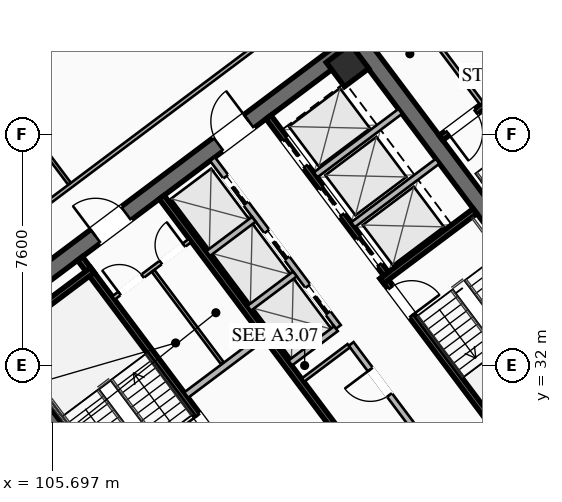
"""IFC4 building model, lengths in metres.
Left out: names, types, materials, properties, quantities, classifications, styles, units other than length and angle.
Written with IfcOpenShell. Run it as: python <this file> out.ifc"""

import sys

from ifc_helpers import new_model, si_unit, direction, frame, frame_2d, origin, origin_2d, place, context, subcontext, project, spatial, rectangle, hollow_rectangle, extrude, element, fill, save


model = new_model("IFC4")
c1 = context("Model", 3, precision=1e-05, world=origin(), true_north=direction((0.0, 1.0)))
c2 = subcontext(c1, "Body", "Model", "MODEL_VIEW")
j1 = project(units=[si_unit("LENGTHUNIT", "METRE"), si_unit("PLANEANGLEUNIT", "RADIAN")], contexts=[c1])
p1 = place(None, origin())
s1 = spatial("IfcSite", under=j1, at=p1, CompositionType="ELEMENT")
p2 = place(p1, origin())
s2 = spatial("IfcBuilding", under=s1, at=p2, CompositionType="ELEMENT")
p3 = place(p2, frame((0.0, 0.0, 196.05)))
s3 = spatial("IfcBuildingStorey", under=s2, at=p3, CompositionType="ELEMENT", Elevation=196.05)
for number, where, z_axis, x_axis in (
    (1, (112.436, 21.077, 0.0), (0.0, 0.0, 1.0), (-0.6, 0.8, 0.0)),
    (2, (115.564, 42.923, 0.0), (0.0, 0.0, 1.0), (0.6, -0.8, 0.0)),
):
    element("IfcWall", number, at=place(p3, frame(where, z_axis=z_axis, x_axis=x_axis)), inside=s3, PredefinedType="SHEAR", context=c2, shape_type="SweptSolid", body=[
        extrude(rectangle(XDim=15.6, YDim=0.55, at=frame_2d((7.8, 0.0))), origin(), (0.0, 0.0, 1.0), 3.55),
    ])
p4 = place(p3, frame((124.539, 30.498, 0.0), z_axis=(0.0, 0.0, 1.0), x_axis=(-0.799998054672, -0.600002593761, 0.0)))
e3 = element("IfcWall", 3, at=p4, inside=s3, PredefinedType="SHEAR", context=c2, shape_type="SweptSolid", body=[
    extrude(rectangle(XDim=15.06, YDim=0.55, at=frame_2d((7.53, 0.0))), origin(), (0.0, 0.0, 1.0), 3.55),
])
p5 = place(p4, frame((9.23, 0.0, 0.0)))
e4 = element("IfcOpeningElement", 4, at=p5, cuts=e3, PredefinedType="OPENING", context=c2, shape_type="SweptSolid", body=[
    extrude(rectangle(XDim=1.25, YDim=2.25, at=frame_2d((0.625, 1.125))), frame((0.0, 0.285, 0.0), z_axis=(0.0, -1.0, 0.0), x_axis=(1.0, 0.0, 0.0)), (0.0, 0.0, 1.0), 0.57),
])
p6 = place(p4, frame((4.18, 0.0, 0.0)))
e5 = element("IfcOpeningElement", 5, at=p6, cuts=e3, PredefinedType="OPENING", context=c2, shape_type="SweptSolid", body=[
    extrude(rectangle(XDim=1.25, YDim=2.25, at=frame_2d((0.625, 1.125))), frame((0.0, 0.285, 0.0), z_axis=(0.0, -1.0, 0.0), x_axis=(1.0, 0.0, 0.0)), (0.0, 0.0, 1.0), 0.57),
])
p7 = place(p3, frame((103.461, 33.502, 0.0), z_axis=(0.0, 0.0, 1.0), x_axis=(0.799998054672, 0.600002593761, 0.0)))
e6 = element("IfcWall", 6, at=p7, inside=s3, PredefinedType="SHEAR", context=c2, shape_type="SweptSolid", body=[
    extrude(rectangle(XDim=15.06, YDim=0.55, at=frame_2d((7.53, 0.0))), origin(), (0.0, 0.0, 1.0), 3.55),
])
p8 = place(p7, frame((4.58, 0.0, 0.0)))
e7 = element("IfcOpeningElement", 7, at=p8, cuts=e6, PredefinedType="OPENING", context=c2, shape_type="SweptSolid", body=[
    extrude(rectangle(XDim=1.25, YDim=2.25, at=frame_2d((0.625, 1.125))), frame((0.0, 0.285, 0.0), z_axis=(0.0, -1.0, 0.0), x_axis=(1.0, 0.0, 0.0)), (0.0, 0.0, 1.0), 0.57),
])
p9 = place(p7, frame((9.63, 0.0, 0.0)))
e8 = element("IfcOpeningElement", 8, at=p9, cuts=e6, PredefinedType="OPENING", context=c2, shape_type="SweptSolid", body=[
    extrude(rectangle(XDim=1.25, YDim=2.25, at=frame_2d((0.625, 1.125))), frame((0.0, 0.285, 0.0), z_axis=(0.0, -1.0, 0.0), x_axis=(1.0, 0.0, 0.0)), (0.0, 0.0, 1.0), 0.57),
])
p10 = place(p3, frame((115.41, 41.87, 0.0), z_axis=(0.0, 0.0, 1.0), x_axis=(0.799999996291, 0.600000004945, 0.0)))
e9 = element("IfcColumn", 9, at=p10, inside=s3, PredefinedType="COLUMN", context=c2, shape_type="SweptSolid", body=[
    extrude(hollow_rectangle(XDim=1.0, YDim=1.0, WallThickness=0.04, at=origin_2d()), origin(), (0.0, 0.0, 1.0), 3.25),
])
p11 = place(p3, frame((98.652, 41.464, 0.0), z_axis=(0.0, 0.0, 1.0), x_axis=(0.799997780501, 0.60000295932, 0.0)))
e10 = element("IfcWall", 10, at=p11, inside=s3, PredefinedType="SOLIDWALL", context=c2, shape_type="SweptSolid", body=[
    extrude(rectangle(XDim=13.2, YDim=0.28, at=frame_2d((6.6, 0.0))), origin(), (0.0, 0.0, 1.0), 3.25),
])
p12 = place(p11, frame((2.2, 0.0, 0.0)))
e11 = element("IfcOpeningElement", 11, at=p12, cuts=e10, PredefinedType="OPENING", context=c2, shape_type="SweptSolid", body=[
    extrude(rectangle(XDim=1.3, YDim=2.15, at=frame_2d((0.65, 1.075))), frame((0.0, 0.15, 0.0), z_axis=(0.0, -1.0, 0.0), x_axis=(1.0, 0.0, 0.0)), (0.0, 0.0, 1.0), 0.3),
])
p13 = place(p11, frame((9.182, 0.0, 0.85)))
e12 = element("IfcOpeningElement", 12, at=p13, cuts=e10, PredefinedType="OPENING", context=c2, shape_type="SweptSolid", body=[
    extrude(rectangle(XDim=1.8, YDim=1.92, at=frame_2d((0.9, 0.96))), frame((0.0, 0.15, 0.0), z_axis=(0.0, -1.0, 0.0), x_axis=(1.0, 0.0, 0.0)), (0.0, 0.0, 1.0), 0.3),
])
p14 = place(p3, frame((111.44, 29.08, 0.0), z_axis=(0.0, 0.0, 1.0), x_axis=(-0.59999029481, 0.8000072788, 0.0)))
e13 = element("IfcWall", 13, at=p14, inside=s3, PredefinedType="SHEAR", context=c2, shape_type="SweptSolid", body=[
    extrude(rectangle(XDim=8.05, YDim=0.2, at=frame_2d((4.025, 0.0))), origin(), (0.0, 0.0, 1.0), 3.25),
])
p15 = place(p14, frame((0.45, 0.0, 0.0)))
e14 = element("IfcOpeningElement", 14, at=p15, cuts=e13, PredefinedType="OPENING", context=c2, shape_type="SweptSolid", body=[
    extrude(rectangle(XDim=1.15, YDim=2.2, at=frame_2d((0.575, 1.1))), frame((0.0, 0.11, 0.0), z_axis=(0.0, -1.0, 0.0), x_axis=(1.0, 0.0, 0.0)), (0.0, 0.0, 1.0), 0.22),
])
p16 = place(p3, frame((103.956, 32.842, 0.0), z_axis=(0.0, 0.0, 1.0), x_axis=(0.800015298837, 0.599979601008, 0.0)))
e15 = element("IfcWall", 15, at=p16, inside=s3, PredefinedType="SHEAR", context=c2, shape_type="SweptSolid", body=[
    extrude(rectangle(XDim=3.83, YDim=0.2, at=frame_2d((1.915, 0.0))), origin(), (0.0, 0.0, 1.0), 3.25),
])
p17 = place(p3, frame((116.56, 34.92, 0.0), z_axis=(0.0, 0.0, 1.0), x_axis=(0.59999029481, -0.8000072788, 0.0)))
e16 = element("IfcWall", 16, at=p17, inside=s3, PredefinedType="SHEAR", context=c2, shape_type="SweptSolid", body=[
    extrude(rectangle(XDim=8.05, YDim=0.2, at=frame_2d((4.025, 0.0))), origin(), (0.0, 0.0, 1.0), 3.25),
])
p18 = place(p17, frame((0.45, 0.0, 0.0)))
e17 = element("IfcOpeningElement", 17, at=p18, cuts=e16, PredefinedType="OPENING", context=c2, shape_type="SweptSolid", body=[
    extrude(rectangle(XDim=1.15, YDim=2.2, at=frame_2d((0.575, 1.1))), frame((0.0, 0.11, 0.0), z_axis=(0.0, -1.0, 0.0), x_axis=(1.0, 0.0, 0.0)), (0.0, 0.0, 1.0), 0.22),
])
p19 = place(p3, frame((116.54, 34.78, 0.0), z_axis=(0.0, 0.0, 1.0), x_axis=(0.800015298837, 0.599979601008, 0.0)))
e18 = element("IfcWall", 18, at=p19, inside=s3, PredefinedType="SHEAR", context=c2, shape_type="SweptSolid", body=[
    extrude(rectangle(XDim=3.83, YDim=0.2, at=frame_2d((1.915, 0.0))), origin(), (0.0, 0.0, 1.0), 3.25),
])
p20 = place(p3, frame((117.998, 25.936, 0.0), z_axis=(0.0, 0.0, 1.0), x_axis=(-0.600002693989, 0.799997979501, 0.0)))
e19 = element("IfcWall", 19, at=p20, inside=s3, PredefinedType="SHEAR", context=c2, shape_type="SweptSolid", body=[
    extrude(rectangle(XDim=14.5, YDim=0.2, at=frame_2d((7.25, 0.0))), origin(), (0.0, 0.0, 1.0), 3.25),
])
p21 = place(p3, frame((110.104, 31.028, 0.0), z_axis=(0.0, 0.0, 1.0), x_axis=(0.800018601094, 0.59997519774, 0.0)))
e20 = element("IfcWall", 20, at=p21, inside=s3, PredefinedType="SOLIDWALL", context=c2, shape_type="SweptSolid", body=[
    extrude(rectangle(XDim=3.15, YDim=0.22, at=frame_2d((1.575, 0.0))), origin(), (0.0, 0.0, 1.0), 2.393),
])
p22 = place(p3, frame((112.81, 40.17, 0.0), z_axis=(0.0, 0.0, 1.0), x_axis=(0.599993943644, -0.800004542231, 0.0)))
e21 = element("IfcWall", 21, at=p22, inside=s3, PredefinedType="SHEAR", context=c2, shape_type="SweptSolid", body=[
    extrude(rectangle(XDim=6.45, YDim=0.2, at=frame_2d((3.225, 0.0))), origin(), (0.0, 0.0, 1.0), 3.25),
])
p23 = place(p22, frame((4.975, 0.0, 0.0)))
e22 = element("IfcOpeningElement", 22, at=p23, cuts=e21, PredefinedType="OPENING", context=c2, shape_type="SweptSolid", body=[
    extrude(rectangle(XDim=1.1, YDim=2.2, at=frame_2d((0.55, 1.1))), frame((0.0, 0.11, 0.0), z_axis=(0.0, -1.0, 0.0), x_axis=(1.0, 0.0, 0.0)), (0.0, 0.0, 1.0), 0.22),
])
p24 = place(p22, frame((2.925, 0.0, 0.0)))
e23 = element("IfcOpeningElement", 23, at=p24, cuts=e21, PredefinedType="OPENING", context=c2, shape_type="SweptSolid", body=[
    extrude(rectangle(XDim=1.1, YDim=2.2, at=frame_2d((0.55, 1.1))), frame((0.0, 0.11, 0.0), z_axis=(0.0, -1.0, 0.0), x_axis=(1.0, 0.0, 0.0)), (0.0, 0.0, 1.0), 0.22),
])
p25 = place(p22, frame((0.925, 0.0, 0.0)))
e24 = element("IfcOpeningElement", 24, at=p25, cuts=e21, PredefinedType="OPENING", context=c2, shape_type="SweptSolid", body=[
    extrude(rectangle(XDim=1.1, YDim=2.2, at=frame_2d((0.55, 1.1))), frame((0.0, 0.11, 0.0), z_axis=(0.0, -1.0, 0.0), x_axis=(1.0, 0.0, 0.0)), (0.0, 0.0, 1.0), 0.22),
])
for number, where, z_axis, x_axis in (
    (25, (115.59, 36.63, 0.0), (0.0, 0.0, 1.0), (0.8, 0.6, 0.0)),
    (26, (114.36, 38.27, 0.0), (0.0, 0.0, 1.0), (0.8, 0.6, 0.0)),
):
    element("IfcWall", number, at=place(p3, frame(where, z_axis=z_axis, x_axis=x_axis)), inside=s3, PredefinedType="SOLIDWALL", context=c2, shape_type="SweptSolid", body=[
        extrude(rectangle(XDim=3.48, YDim=0.2, at=frame_2d((1.74, 0.0))), origin(), (0.0, 0.0, 1.0), 3.25),
    ])
p26 = place(p3, frame((107.71, 34.22, 0.0), z_axis=(0.0, 0.0, 1.0), x_axis=(0.799981399002, 0.60002480053, 0.0)))
e27 = element("IfcWall", 27, at=p26, inside=s3, PredefinedType="PARTITIONING", context=c2, shape_type="SweptSolid", body=[
    extrude(rectangle(XDim=3.15, YDim=0.135, at=frame_2d((1.575, 0.0))), origin(), (0.0, 0.0, 1.0), 2.393),
])
p27 = place(p26, frame((0.25, 0.0, 0.0)))
e28 = element("IfcOpeningElement", 28, at=p27, cuts=e27, PredefinedType="OPENING", context=c2, shape_type="SweptSolid", body=[
    extrude(rectangle(XDim=0.95, YDim=2.05, at=frame_2d((0.475, 1.025))), frame((0.0, 0.077, 0.0), z_axis=(0.0, -1.0, 0.0), x_axis=(1.0, 0.0, 0.0)), (0.0, 0.0, 1.0), 0.155),
])
p28 = place(p26, frame((1.95, 0.0, 0.0)))
e29 = element("IfcOpeningElement", 29, at=p28, cuts=e27, PredefinedType="OPENING", context=c2, shape_type="SweptSolid", body=[
    extrude(rectangle(XDim=0.95, YDim=2.05, at=frame_2d((0.475, 1.025))), frame((0.0, 0.077, 0.0), z_axis=(0.0, -1.0, 0.0), x_axis=(1.0, 0.0, 0.0)), (0.0, 0.0, 1.0), 0.155),
])
p29 = place(p3, frame((111.296, 32.072, 0.0), z_axis=(0.0, 0.0, 1.0), x_axis=(-0.59995887973, 0.800030838552, 0.0)))
e30 = element("IfcWall", 30, at=p29, inside=s3, PredefinedType="PARTITIONING", context=c2, shape_type="SweptSolid", body=[
    extrude(rectangle(XDim=3.8, YDim=0.11, at=frame_2d((1.9, 0.0))), origin(), (0.0, 0.0, 1.0), 2.393),
])
p30 = place(p3, frame((119.67, 27.19, 0.0), z_axis=(0.0, 0.0, 1.0), x_axis=(-0.599988677396, 0.800008491828, 0.0)))
e31 = element("IfcWall", 31, at=p30, inside=s3, PredefinedType="SOLIDWALL", context=c2, shape_type="SweptSolid", body=[
    extrude(rectangle(XDim=6.9, YDim=0.2, at=frame_2d((3.45, 0.0))), origin(), (0.0, 0.0, 1.0), 2.393),
])
p31 = place(p30, frame((0.85, 0.0, 0.0)))
e32 = element("IfcOpeningElement", 32, at=p31, cuts=e31, PredefinedType="OPENING", context=c2, shape_type="SweptSolid", body=[
    extrude(rectangle(XDim=0.95, YDim=2.05, at=frame_2d((0.475, 1.025))), frame((0.0, 0.11, 0.0), z_axis=(0.0, -1.0, 0.0), x_axis=(1.0, 0.0, 0.0)), (0.0, 0.0, 1.0), 0.22),
])
p32 = place(p30, frame((4.8, 0.0, 0.0)))
e33 = element("IfcOpeningElement", 33, at=p32, cuts=e31, PredefinedType="OPENING", context=c2, shape_type="SweptSolid", body=[
    extrude(rectangle(XDim=1.05, YDim=2.2, at=frame_2d((0.525, 1.1))), frame((0.0, 0.11, 0.0), z_axis=(0.0, -1.0, 0.0), x_axis=(1.0, 0.0, 0.0)), (0.0, 0.0, 1.0), 0.22),
])
p33 = place(p3, frame((113.946, 31.522, 0.0), z_axis=(0.0, 0.0, 1.0), x_axis=(0.8, 0.6, 0.0)))
e34 = element("IfcWall", 34, at=p33, inside=s3, PredefinedType="PARTITIONING", context=c2, shape_type="SweptSolid", body=[
    extrude(rectangle(XDim=1.88, YDim=0.135, at=frame_2d((0.94, 0.0))), origin(), (0.0, 0.0, 1.0), 2.393),
])
p34 = place(p3, frame((115.11, 33.27, 0.0), z_axis=(0.0, 0.0, 1.0), x_axis=(-0.600011322243, 0.799991508192, 0.0)))
e35 = element("IfcWall", 35, at=p34, inside=s3, PredefinedType="SOLIDWALL", context=c2, shape_type="SweptSolid", body=[
    extrude(rectangle(XDim=6.9, YDim=0.2, at=frame_2d((3.45, 0.0))), origin(), (0.0, 0.0, 1.0), 3.25),
])
p35 = place(p34, frame((0.575, 0.0, 0.0)))
e36 = element("IfcOpeningElement", 36, at=p35, cuts=e35, PredefinedType="OPENING", context=c2, shape_type="SweptSolid", body=[
    extrude(rectangle(XDim=1.1, YDim=2.2, at=frame_2d((0.55, 1.1))), frame((0.0, 0.11, 0.0), z_axis=(0.0, -1.0, 0.0), x_axis=(1.0, 0.0, 0.0)), (0.0, 0.0, 1.0), 0.22),
])
p36 = place(p34, frame((2.825, 0.0, 0.0)))
e37 = element("IfcOpeningElement", 37, at=p36, cuts=e35, PredefinedType="OPENING", context=c2, shape_type="SweptSolid", body=[
    extrude(rectangle(XDim=1.1, YDim=2.2, at=frame_2d((0.55, 1.1))), frame((0.0, 0.11, 0.0), z_axis=(0.0, -1.0, 0.0), x_axis=(1.0, 0.0, 0.0)), (0.0, 0.0, 1.0), 0.22),
])
p37 = place(p34, frame((5.075, 0.0, 0.0)))
e38 = element("IfcOpeningElement", 38, at=p37, cuts=e35, PredefinedType="OPENING", context=c2, shape_type="SweptSolid", body=[
    extrude(rectangle(XDim=1.1, YDim=2.2, at=frame_2d((0.55, 1.1))), frame((0.0, 0.11, 0.0), z_axis=(0.0, -1.0, 0.0), x_axis=(1.0, 0.0, 0.0)), (0.0, 0.0, 1.0), 0.22),
])
p38 = place(p3, frame((113.526, 32.082, 0.0), z_axis=(0.0, 0.0, 1.0), x_axis=(0.800046745961, 0.599937666993, 0.0)))
e39 = element("IfcWall", 39, at=p38, inside=s3, PredefinedType="SOLIDWALL", context=c2, shape_type="SweptSolid", body=[
    extrude(rectangle(XDim=1.88, YDim=0.2, at=frame_2d((0.94, 0.0))), origin(), (0.0, 0.0, 1.0), 3.25),
])
p39 = place(p3, frame((112.176, 33.882, 0.0), z_axis=(0.0, 0.0, 1.0), x_axis=(0.8, 0.6, 0.0)))
e40 = element("IfcWall", 40, at=p39, inside=s3, PredefinedType="SOLIDWALL", context=c2, shape_type="SweptSolid", body=[
    extrude(rectangle(XDim=1.88, YDim=0.2, at=frame_2d((0.94, 0.0))), origin(), (0.0, 0.0, 1.0), 3.25),
])
p40 = place(p3, frame((110.826, 35.682, 0.0), z_axis=(0.0, 0.0, 1.0), x_axis=(0.799984418148, 0.600020775241, 0.0)))
e41 = element("IfcWall", 41, at=p40, inside=s3, PredefinedType="SOLIDWALL", context=c2, shape_type="SweptSolid", body=[
    extrude(rectangle(XDim=1.88, YDim=0.2, at=frame_2d((0.94, 0.0))), origin(), (0.0, 0.0, 1.0), 3.25),
])
p41 = place(p3, frame((121.204, 41.528, 0.0), z_axis=(0.0, 0.0, 1.0), x_axis=(-0.800017232136, -0.599977023131, 0.0)))
e42 = element("IfcWall", 42, at=p41, inside=s3, PredefinedType="SHEAR", context=c2, shape_type="SweptSolid", body=[
    extrude(rectangle(XDim=3.4, YDim=0.2, at=frame_2d((1.7, 0.0))), origin(), (0.0, 0.0, 1.0), 3.25),
])
p42 = place(p41, frame((1.975, 0.0, 0.0)))
e43 = element("IfcOpeningElement", 43, at=p42, cuts=e42, PredefinedType="OPENING", context=c2, shape_type="SweptSolid", body=[
    extrude(rectangle(XDim=1.15, YDim=2.2, at=frame_2d((0.575, 1.1))), frame((0.0, 0.11, 0.0), z_axis=(0.0, -1.0, 0.0), x_axis=(1.0, 0.0, 0.0)), (0.0, 0.0, 1.0), 0.22),
])
p43 = place(p3, frame((119.824, 40.618, 0.0), z_axis=(0.0, 0.0, 1.0), x_axis=(-0.599982243973, 0.800013316712, 0.0)))
e44 = element("IfcWall", 44, at=p43, inside=s3, PredefinedType="PARTITIONING", context=c2, shape_type="SweptSolid", body=[
    extrude(rectangle(XDim=4.4, YDim=0.135, at=frame_2d((2.2, 0.0))), origin(), (0.0, 0.0, 1.0), 2.393),
])
p44 = place(p3, frame((96.91, 30.87, 0.0), z_axis=(0.0, 0.0, 1.0), x_axis=(0.800003062365, 0.599995916825, 0.0)))
e45 = element("IfcWall", 45, at=p44, inside=s3, PredefinedType="PARTITIONING", context=c2, shape_type="SweptSolid", body=[
    extrude(rectangle(XDim=28.7, YDim=0.135, at=frame_2d((14.35, 0.0))), origin(), (0.0, 0.0, 1.0), 2.393),
])
p45 = place(p44, frame((0.3, 0.0, 0.0)))
e46 = element("IfcOpeningElement", 46, at=p45, cuts=e45, PredefinedType="OPENING", context=c2, shape_type="SweptSolid", body=[
    extrude(rectangle(XDim=0.95, YDim=2.05, at=frame_2d((0.475, 1.025))), frame((0.0, 0.077, 0.0), z_axis=(0.0, -1.0, 0.0), x_axis=(1.0, 0.0, 0.0)), (0.0, 0.0, 1.0), 0.155),
])
p46 = place(p44, frame((27.45, 0.0, 0.0)))
e47 = element("IfcOpeningElement", 47, at=p46, cuts=e45, PredefinedType="OPENING", context=c2, shape_type="SweptSolid", body=[
    extrude(rectangle(XDim=0.95, YDim=2.05, at=frame_2d((0.475, 1.025))), frame((0.0, 0.077, 0.0), z_axis=(0.0, -1.0, 0.0), x_axis=(1.0, 0.0, 0.0)), (0.0, 0.0, 1.0), 0.155),
])
p47 = place(p3, frame((106.262, 37.984, 0.0), z_axis=(0.0, 0.0, 1.0), x_axis=(-0.600005425297, 0.799995930999, 0.0)))
e48 = element("IfcWall", 48, at=p47, inside=s3, PredefinedType="PARTITIONING", context=c2, shape_type="SweptSolid", body=[
    extrude(rectangle(XDim=7.2, YDim=0.11, at=frame_2d((3.6, 0.0))), origin(), (0.0, 0.0, 1.0), 2.393),
])
p48 = place(p3, frame((131.282, 32.874, 0.0), z_axis=(0.0, 0.0, 1.0), x_axis=(-0.8, -0.6, 0.0)))
e49 = element("IfcWall", 49, at=p48, inside=s3, PredefinedType="PARTITIONING", context=c2, shape_type="SweptSolid", body=[
    extrude(rectangle(XDim=28.7, YDim=0.135, at=frame_2d((14.35, 0.0))), origin(), (0.0, 0.0, 1.0), 2.393),
])
p49 = place(p48, frame((27.37, 0.0, 0.0)))
e50 = element("IfcOpeningElement", 50, at=p49, cuts=e49, PredefinedType="OPENING", context=c2, shape_type="SweptSolid", body=[
    extrude(rectangle(XDim=0.95, YDim=2.05, at=frame_2d((0.475, 1.025))), frame((0.0, 0.077, 0.0), z_axis=(0.0, -1.0, 0.0), x_axis=(1.0, 0.0, 0.0)), (0.0, 0.0, 1.0), 0.155),
])
p50 = place(p48, frame((0.38, 0.0, 0.0)))
e51 = element("IfcOpeningElement", 51, at=p50, cuts=e49, PredefinedType="OPENING", context=c2, shape_type="SweptSolid", body=[
    extrude(rectangle(XDim=0.95, YDim=2.05, at=frame_2d((0.475, 1.025))), frame((0.0, 0.077, 0.0), z_axis=(0.0, -1.0, 0.0), x_axis=(1.0, 0.0, 0.0)), (0.0, 0.0, 1.0), 0.155),
])
p51 = place(p3, frame((112.104, 20.928, 0.0), z_axis=(0.0, 0.0, 1.0), x_axis=(-0.599994940075, 0.800003794918, 0.0)))
e52 = element("IfcWall", 52, at=p51, inside=s3, PredefinedType="PARTITIONING", context=c2, shape_type="SweptSolid", body=[
    extrude(rectangle(XDim=15.44, YDim=0.135, at=frame_2d((7.72, 0.0))), origin(), (0.0, 0.0, 1.0), 2.393),
])
p52 = place(p8, origin())
e53 = element("IfcDoor", 53, at=p52, inside=s3, OperationType="SINGLE_SWING_LEFT", PredefinedType="DOOR", context=c2, shape_type="SweptSolid", body=[
    extrude(rectangle(XDim=1.25, YDim=2.25, at=frame_2d((0.625, 1.125))), frame((0.0, 0.025, 0.0), z_axis=(0.0, -1.0, 0.0), x_axis=(1.0, 0.0, 0.0)), (0.0, 0.0, 1.0), 0.05),
])
fill(e7, e53)
p53 = place(p9, origin())
e54 = element("IfcDoor", 54, at=p53, inside=s3, OperationType="SINGLE_SWING_RIGHT", PredefinedType="DOOR", context=c2, shape_type="SweptSolid", body=[
    extrude(rectangle(XDim=1.25, YDim=2.25, at=frame_2d((0.625, 1.125))), frame((0.0, 0.025, 0.0), z_axis=(0.0, -1.0, 0.0), x_axis=(1.0, 0.0, 0.0)), (0.0, 0.0, 1.0), 0.05),
])
fill(e8, e54)
p54 = place(p15, origin())
e55 = element("IfcDoor", 55, at=p54, inside=s3, OperationType="SINGLE_SWING_RIGHT", PredefinedType="DOOR", context=c2, shape_type="SweptSolid", body=[
    extrude(rectangle(XDim=1.15, YDim=2.2, at=frame_2d((0.575, 1.1))), frame((0.0, 0.025, 0.0), z_axis=(0.0, -1.0, 0.0), x_axis=(1.0, 0.0, 0.0)), (0.0, 0.0, 1.0), 0.05),
])
fill(e14, e55)
p55 = place(p18, origin())
e56 = element("IfcDoor", 56, at=p55, inside=s3, OperationType="SINGLE_SWING_RIGHT", PredefinedType="DOOR", context=c2, shape_type="SweptSolid", body=[
    extrude(rectangle(XDim=1.15, YDim=2.2, at=frame_2d((0.575, 1.1))), frame((0.0, 0.025, 0.0), z_axis=(0.0, -1.0, 0.0), x_axis=(1.0, 0.0, 0.0)), (0.0, 0.0, 1.0), 0.05),
])
fill(e17, e56)
p56 = place(p27, origin())
e57 = element("IfcDoor", 57, at=p56, inside=s3, OperationType="SINGLE_SWING_LEFT", PredefinedType="DOOR", context=c2, shape_type="SweptSolid", body=[
    extrude(rectangle(XDim=0.95, YDim=2.05, at=frame_2d((0.475, 1.025))), frame((0.0, 0.025, 0.0), z_axis=(0.0, -1.0, 0.0), x_axis=(1.0, 0.0, 0.0)), (0.0, 0.0, 1.0), 0.05),
])
fill(e28, e57)
p57 = place(p28, origin())
e58 = element("IfcDoor", 58, at=p57, inside=s3, OperationType="SINGLE_SWING_RIGHT", PredefinedType="DOOR", context=c2, shape_type="SweptSolid", body=[
    extrude(rectangle(XDim=0.95, YDim=2.05, at=frame_2d((0.475, 1.025))), frame((0.0, 0.025, 0.0), z_axis=(0.0, -1.0, 0.0), x_axis=(1.0, 0.0, 0.0)), (0.0, 0.0, 1.0), 0.05),
])
fill(e29, e58)
p58 = place(p32, origin())
e59 = element("IfcDoor", 59, at=p58, inside=s3, OperationType="SINGLE_SWING_RIGHT", PredefinedType="DOOR", context=c2, shape_type="SweptSolid", body=[
    extrude(rectangle(XDim=1.05, YDim=2.2, at=frame_2d((0.525, 1.1))), frame((0.0, 0.025, 0.0), z_axis=(0.0, -1.0, 0.0), x_axis=(1.0, 0.0, 0.0)), (0.0, 0.0, 1.0), 0.05),
])
fill(e33, e59)
p59 = place(p42, origin())
e60 = element("IfcDoor", 60, at=p59, inside=s3, OperationType="SINGLE_SWING_RIGHT", PredefinedType="DOOR", context=c2, shape_type="SweptSolid", body=[
    extrude(rectangle(XDim=1.15, YDim=2.2, at=frame_2d((0.575, 1.1))), frame((0.0, 0.025, 0.0), z_axis=(0.0, -1.0, 0.0), x_axis=(1.0, 0.0, 0.0)), (0.0, 0.0, 1.0), 0.05),
])
fill(e43, e60)
p60 = place(p35, origin())
e61 = element("IfcDoor", 61, at=p60, inside=s3, OperationType="SLIDING_TO_LEFT", PredefinedType="DOOR", context=c2, shape_type="SweptSolid", body=[
    extrude(rectangle(XDim=1.1, YDim=2.2, at=frame_2d((0.55, 1.1))), frame((0.0, 0.025, 0.0), z_axis=(0.0, -1.0, 0.0), x_axis=(1.0, 0.0, 0.0)), (0.0, 0.0, 1.0), 0.05),
])
fill(e36, e61)
p61 = place(p36, origin())
e62 = element("IfcDoor", 62, at=p61, inside=s3, OperationType="SLIDING_TO_LEFT", PredefinedType="DOOR", context=c2, shape_type="SweptSolid", body=[
    extrude(rectangle(XDim=1.1, YDim=2.2, at=frame_2d((0.55, 1.1))), frame((0.0, 0.025, 0.0), z_axis=(0.0, -1.0, 0.0), x_axis=(1.0, 0.0, 0.0)), (0.0, 0.0, 1.0), 0.05),
])
fill(e37, e62)
p62 = place(p37, origin())
e63 = element("IfcDoor", 63, at=p62, inside=s3, OperationType="SLIDING_TO_LEFT", PredefinedType="DOOR", context=c2, shape_type="SweptSolid", body=[
    extrude(rectangle(XDim=1.1, YDim=2.2, at=frame_2d((0.55, 1.1))), frame((0.0, 0.025, 0.0), z_axis=(0.0, -1.0, 0.0), x_axis=(1.0, 0.0, 0.0)), (0.0, 0.0, 1.0), 0.05),
])
fill(e38, e63)
p63 = place(p23, origin())
e64 = element("IfcDoor", 64, at=p63, inside=s3, OperationType="SLIDING_TO_LEFT", PredefinedType="DOOR", context=c2, shape_type="SweptSolid", body=[
    extrude(rectangle(XDim=1.1, YDim=2.2, at=frame_2d((0.55, 1.1))), frame((0.0, 0.025, 0.0), z_axis=(0.0, -1.0, 0.0), x_axis=(1.0, 0.0, 0.0)), (0.0, 0.0, 1.0), 0.05),
])
fill(e22, e64)
p64 = place(p24, origin())
e65 = element("IfcDoor", 65, at=p64, inside=s3, OperationType="SLIDING_TO_LEFT", PredefinedType="DOOR", context=c2, shape_type="SweptSolid", body=[
    extrude(rectangle(XDim=1.1, YDim=2.2, at=frame_2d((0.55, 1.1))), frame((0.0, 0.025, 0.0), z_axis=(0.0, -1.0, 0.0), x_axis=(1.0, 0.0, 0.0)), (0.0, 0.0, 1.0), 0.05),
])
fill(e23, e65)
p65 = place(p25, origin())
e66 = element("IfcDoor", 66, at=p65, inside=s3, OperationType="SLIDING_TO_LEFT", PredefinedType="DOOR", context=c2, shape_type="SweptSolid", body=[
    extrude(rectangle(XDim=1.1, YDim=2.2, at=frame_2d((0.55, 1.1))), frame((0.0, 0.025, 0.0), z_axis=(0.0, -1.0, 0.0), x_axis=(1.0, 0.0, 0.0)), (0.0, 0.0, 1.0), 0.05),
])
fill(e24, e66)
save(model, sys.argv[1])
